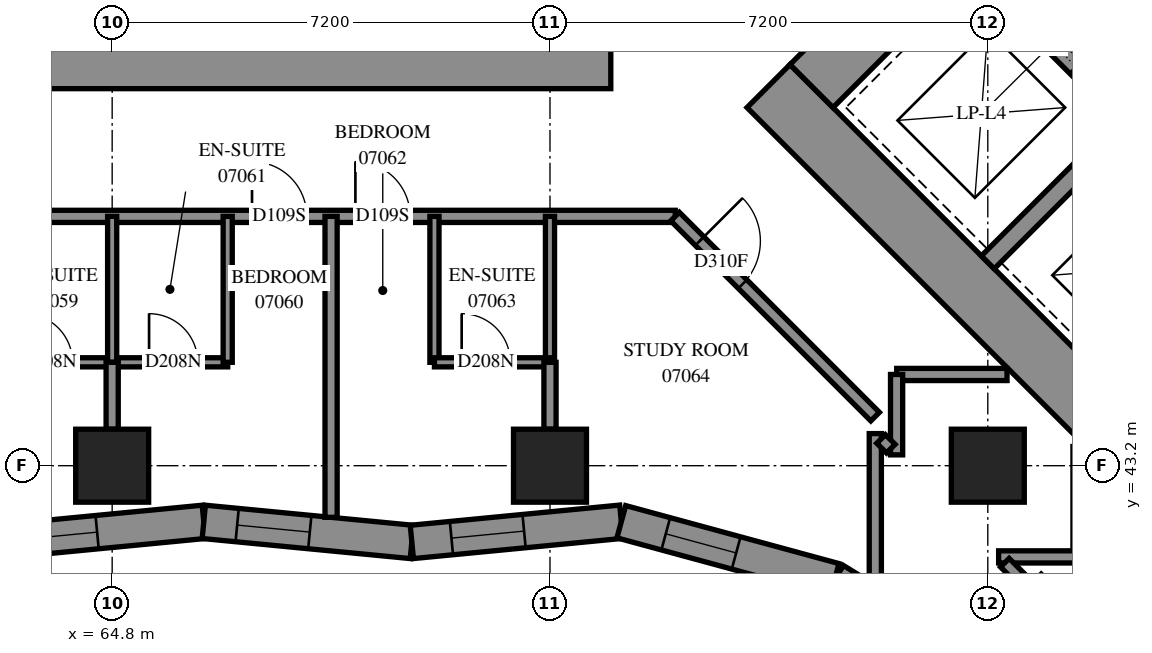
"""IFC4 building model, lengths in metres.
Left out: names, types, materials, properties, quantities, classifications, styles, units other than length and angle.
Written with IfcOpenShell. Run it as: python <this file> out.ifc"""

import sys

from ifc_helpers import new_model, si_unit, direction, frame, frame_2d, origin, origin_2d, place, context, subcontext, project, spatial, polyline, rectangle, outline, extrude, element, fill, save


model = new_model("IFC4")
c1 = context("Model", 3, precision=1e-05, world=origin(), true_north=direction((0.0, 1.0)))
c2 = subcontext(c1, "Body", "Model", "MODEL_VIEW")
j1 = project(units=[si_unit("LENGTHUNIT", "METRE"), si_unit("PLANEANGLEUNIT", "RADIAN")], contexts=[c1])
p1 = place(None, origin())
s1 = spatial("IfcSite", under=j1, at=p1, CompositionType="ELEMENT")
p2 = place(p1, origin())
s2 = spatial("IfcBuilding", under=s1, at=p2, CompositionType="ELEMENT")
p3 = place(p2, frame((0.0, 0.0, 30.4)))
s3 = spatial("IfcBuildingStorey", under=s2, at=p3, CompositionType="ELEMENT", Elevation=30.4)
for number, where, z_axis, x_axis in (
    (1, (64.8, 43.2, 0.0), (0.0, 0.0, 1.0), (1.0, 0.0, 0.0)),
    (2, (72.0, 43.2, 0.0), (0.0, 0.0, 1.0), (1.0, 0.0, 0.0)),
    (3, (79.2, 43.2, 0.0), (0.0, 0.0, 1.0), (1.0, 0.0, 0.0)),
):
    element("IfcColumn", number, at=place(p3, frame(where, z_axis=z_axis, x_axis=x_axis)), inside=s3, PredefinedType="COLUMN", context=c2, shape_type="SweptSolid", body=[
        extrude(rectangle(XDim=1.2, YDim=1.2, at=origin_2d()), origin(), (0.0, 0.0, 1.0), 3.1),
    ])
for number, where, z_axis, x_axis in (
    (4, (56.6, 49.9, -0.3), (0.0, 0.0, 1.0), (1.0, 0.0, 0.0)),
    (5, (75.594, 49.443, -0.3), (0.0, 0.0, 1.0), (0.707, -0.707, 0.0)),
):
    element("IfcWall", number, at=place(p3, frame(where, z_axis=z_axis, x_axis=x_axis)), inside=s3, PredefinedType="SHEAR", context=c2, shape_type="SweptSolid", body=[
        extrude(rectangle(XDim=16.4, YDim=1.0, at=frame_2d((8.2, 0.0))), origin(), (0.0, 0.0, 1.0), 2.7),
    ])
p4 = place(p3, frame((76.301, 49.443, -0.3), z_axis=(0.0, 0.0, 1.0), x_axis=(0.7071067812, 0.7071067812, 0.0)))
e6 = element("IfcWall", 6, at=p4, inside=s3, PredefinedType="SHEAR", context=c2, shape_type="SweptSolid", body=[
    extrude(rectangle(XDim=14.4, YDim=1.0, at=frame_2d((7.2, 0.0))), origin(), (0.0, 0.0, 1.0), 2.7),
])
p5 = place(p4, frame((4.55, 0.0, 0.3)))
e7 = element("IfcOpeningElement", 7, at=p5, cuts=e6, PredefinedType="OPENING", context=c2, shape_type="SweptSolid", body=[
    extrude(rectangle(XDim=1.1, YDim=2.1, at=frame_2d((0.55, 1.05))), frame((0.0, 0.51, 0.0), z_axis=(0.0, -1.0, 0.0), x_axis=(1.0, 0.0, 0.0)), (0.0, 0.0, 1.0), 1.02),
])
p6 = place(p4, frame((11.35, 0.0, 0.3)))
e8 = element("IfcOpeningElement", 8, at=p6, cuts=e6, PredefinedType="OPENING", context=c2, shape_type="SweptSolid", body=[
    extrude(rectangle(XDim=1.1, YDim=2.1, at=frame_2d((0.55, 1.05))), frame((0.0, 0.51, 0.0), z_axis=(0.0, -1.0, 0.0), x_axis=(1.0, 0.0, 0.0)), (0.0, 0.0, 1.0), 1.02),
])
p7 = place(p3, frame((79.2, 46.544, 0.0), z_axis=(0.0, 0.0, 1.0), x_axis=(0.7071219326, 0.7070916295, 0.0)))
e9 = element("IfcWall", 9, at=p7, inside=s3, PredefinedType="SOLIDWALL", context=c2, shape_type="SweptSolid", body=[
    extrude(rectangle(XDim=3.3, YDim=0.3, at=frame_2d((1.65, 0.0))), origin(), (0.0, 0.0, 1.0), 3.1),
])
p8 = place(p3, frame((78.988, 51.423, 0.0), z_axis=(0.0, 0.0, 1.0), x_axis=(0.7071067812, -0.7071067812, 0.0)))
e10 = element("IfcWall", 10, at=p8, inside=s3, PredefinedType="SOLIDWALL", context=c2, shape_type="SweptSolid", body=[
    extrude(rectangle(XDim=14.4, YDim=0.3, at=frame_2d((7.2, 0.0))), origin(), (0.0, 0.0, 1.0), 3.1),
])
p9 = place(p8, frame((1.25, 0.0, 0.0)))
e11 = element("IfcOpeningElement", 11, at=p9, cuts=e10, PredefinedType="OPENING", context=c2, shape_type="SweptSolid", body=[
    extrude(rectangle(XDim=1.1, YDim=2.1, at=frame_2d((0.55, 1.05))), frame((0.0, 0.16, 0.0), z_axis=(0.0, -1.0, 0.0), x_axis=(1.0, 0.0, 0.0)), (0.0, 0.0, 1.0), 0.32),
])
p10 = place(p8, frame((4.85, 0.0, 0.0)))
e12 = element("IfcOpeningElement", 12, at=p10, cuts=e10, PredefinedType="OPENING", context=c2, shape_type="SweptSolid", body=[
    extrude(rectangle(XDim=1.1, YDim=2.1, at=frame_2d((0.55, 1.05))), frame((0.0, 0.16, 0.0), z_axis=(0.0, -1.0, 0.0), x_axis=(1.0, 0.0, 0.0)), (0.0, 0.0, 1.0), 0.32),
])
p11 = place(p8, frame((8.45, 0.0, 0.0)))
e13 = element("IfcOpeningElement", 13, at=p11, cuts=e10, PredefinedType="OPENING", context=c2, shape_type="SweptSolid", body=[
    extrude(rectangle(XDim=1.1, YDim=2.1, at=frame_2d((0.55, 1.05))), frame((0.0, 0.16, 0.0), z_axis=(0.0, -1.0, 0.0), x_axis=(1.0, 0.0, 0.0)), (0.0, 0.0, 1.0), 0.32),
])
p12 = place(p8, frame((12.05, 0.0, 0.0)))
e14 = element("IfcOpeningElement", 14, at=p12, cuts=e10, PredefinedType="OPENING", context=c2, shape_type="SweptSolid", body=[
    extrude(rectangle(XDim=1.1, YDim=2.1, at=frame_2d((0.55, 1.05))), frame((0.0, 0.16, 0.0), z_axis=(0.0, -1.0, 0.0), x_axis=(1.0, 0.0, 0.0)), (0.0, 0.0, 1.0), 0.32),
])
p13 = place(p3, frame((62.885, 41.946, 0.0), z_axis=(0.0, 0.0, 1.0), x_axis=(0.9953807351, 0.0960062087, 0.0)))
e15 = element("IfcWall", 15, at=p13, inside=s3, PredefinedType="SOLIDWALL", context=c2, shape_type="SweptSolid", body=[
    extrude(outline(polyline([(-0.026, -0.275), (3.411, -0.275), (3.464, 0.275), (0.026, 0.275), (-0.026, -0.275)])), origin(), (0.0, 0.0, 1.0), 3.1),
])
p14 = place(p13, frame((0.475, 0.0, 0.5)))
e16 = element("IfcOpeningElement", 16, at=p14, cuts=e15, PredefinedType="OPENING", context=c2, shape_type="SweptSolid", body=[
    extrude(rectangle(XDim=1.2, YDim=2.45, at=frame_2d((0.6, 1.225))), frame((0.0, 0.285, 0.0), z_axis=(0.0, -1.0, 0.0), x_axis=(1.0, 0.0, 0.0)), (0.0, 0.0, 1.0), 0.57),
])
p15 = place(p3, frame((66.307, 42.276, 0.0), z_axis=(0.0, 0.0, 1.0), x_axis=(0.995380467, -0.096008989, 0.0)))
e17 = element("IfcWall", 17, at=p15, inside=s3, PredefinedType="SOLIDWALL", context=c2, shape_type="SweptSolid", body=[
    extrude(outline(polyline([(0.026, -0.275), (3.464, -0.275), (3.411, 0.275), (-0.026, 0.275), (0.026, -0.275)])), origin(), (0.0, 0.0, 1.0), 3.1),
])
p16 = place(p15, frame((0.551, 0.0, 0.5)))
e18 = element("IfcOpeningElement", 18, at=p16, cuts=e17, PredefinedType="OPENING", context=c2, shape_type="SweptSolid", body=[
    extrude(rectangle(XDim=1.2, YDim=2.45, at=frame_2d((0.6, 1.225))), frame((0.0, 0.285, 0.0), z_axis=(0.0, -1.0, 0.0), x_axis=(1.0, 0.0, 0.0)), (0.0, 0.0, 1.0), 0.57),
])
p17 = place(p3, frame((69.728, 41.946, 0.0), z_axis=(0.0, 0.0, 1.0), x_axis=(0.9953800797, 0.0960130045, 0.0)))
e19 = element("IfcWall", 19, at=p17, inside=s3, PredefinedType="SOLIDWALL", context=c2, shape_type="SweptSolid", body=[
    extrude(outline(polyline([(-0.026, -0.275), (3.411, -0.275), (3.511, 0.275), (0.026, 0.275), (-0.026, -0.275)])), origin(), (0.0, 0.0, 1.0), 3.1),
])
p18 = place(p17, frame((0.654, 0.0, 0.5)))
e20 = element("IfcOpeningElement", 20, at=p18, cuts=e19, PredefinedType="OPENING", context=c2, shape_type="SweptSolid", body=[
    extrude(rectangle(XDim=1.2, YDim=2.45, at=frame_2d((0.6, 1.225))), frame((0.0, 0.285, 0.0), z_axis=(0.0, -1.0, 0.0), x_axis=(1.0, 0.0, 0.0)), (0.0, 0.0, 1.0), 0.57),
])
p19 = place(p3, frame((73.173, 42.279, 0.0), z_axis=(0.0, 0.0, 1.0), x_axis=(0.9649780745, -0.2623305467, 0.0)))
e21 = element("IfcWall", 21, at=p19, inside=s3, PredefinedType="SOLIDWALL", context=c2, shape_type="SweptSolid", body=[
    extrude(outline(polyline([(0.05, -0.275), (3.596, -0.275), (3.675, 0.275), (-0.05, 0.275), (0.05, -0.275)])), origin(), (0.0, 0.0, 1.0), 3.1),
])
p20 = place(p19, frame((0.757, 0.0, 0.5)))
e22 = element("IfcOpeningElement", 22, at=p20, cuts=e21, PredefinedType="OPENING", context=c2, shape_type="SweptSolid", body=[
    extrude(rectangle(XDim=1.2, YDim=2.45, at=frame_2d((0.6, 1.225))), frame((0.0, 0.285, 0.0), z_axis=(0.0, -1.0, 0.0), x_axis=(1.0, 0.0, 0.0)), (0.0, 0.0, 1.0), 0.57),
])
p21 = place(p3, frame((76.681, 41.325, 0.0), z_axis=(0.0, 0.0, 1.0), x_axis=(0.852496072, -0.5227336293, 0.0)))
e23 = element("IfcWall", 23, at=p21, inside=s3, PredefinedType="SOLIDWALL", context=c2, shape_type="SweptSolid", body=[
    extrude(outline(polyline([(0.039, -0.275), (4.028, -0.275), (4.117, 0.275), (-0.039, 0.275), (0.039, -0.275)])), origin(), (0.0, 0.0, 1.0), 3.1),
])
p22 = place(p21, frame((0.719, 0.0, 0.5)))
e24 = element("IfcOpeningElement", 24, at=p22, cuts=e23, PredefinedType="OPENING", context=c2, shape_type="SweptSolid", body=[
    extrude(rectangle(XDim=1.2, YDim=2.45, at=frame_2d((0.6, 1.225))), frame((0.0, 0.285, 0.0), z_axis=(0.0, -1.0, 0.0), x_axis=(1.0, 0.0, 0.0)), (0.0, 0.0, 1.0), 0.57),
])
p23 = place(p21, frame((2.206, 0.0, 0.5)))
e25 = element("IfcOpeningElement", 25, at=p23, cuts=e23, PredefinedType="OPENING", context=c2, shape_type="SweptSolid", body=[
    extrude(rectangle(XDim=1.2, YDim=2.45, at=frame_2d((0.6, 1.225))), frame((0.0, 0.285, 0.0), z_axis=(0.0, -1.0, 0.0), x_axis=(1.0, 0.0, 0.0)), (0.0, 0.0, 1.0), 0.57),
])
p24 = place(p3, frame((54.5, 47.3, 0.0), z_axis=(0.0, 0.0, 1.0), x_axis=(1.0, 0.0, 0.0)))
e26 = element("IfcWall", 26, at=p24, inside=s3, PredefinedType="PARTITIONING", context=c2, shape_type="SweptSolid", body=[
    extrude(rectangle(XDim=19.56, YDim=0.2, at=frame_2d((9.78, 0.0))), origin(), (0.0, 0.0, 1.0), 3.1),
])
p25 = place(p24, frame((0.243, 0.0, 0.0)))
e27 = element("IfcOpeningElement", 27, at=p25, cuts=e26, PredefinedType="OPENING", context=c2, shape_type="SweptSolid", body=[
    extrude(rectangle(XDim=1.0, YDim=2.1, at=frame_2d((0.5, 1.05))), frame((0.0, 0.11, 0.0), z_axis=(0.0, -1.0, 0.0), x_axis=(1.0, 0.0, 0.0)), (0.0, 0.0, 1.0), 0.22),
])
p26 = place(p24, frame((5.4, 0.0, 0.0)))
e28 = element("IfcOpeningElement", 28, at=p26, cuts=e26, PredefinedType="OPENING", context=c2, shape_type="SweptSolid", body=[
    extrude(rectangle(XDim=0.9, YDim=2.1, at=frame_2d((0.45, 1.05))), frame((0.0, 0.11, 0.0), z_axis=(0.0, -1.0, 0.0), x_axis=(1.0, 0.0, 0.0)), (0.0, 0.0, 1.0), 0.22),
])
p27 = place(p24, frame((7.1, 0.0, 0.0)))
e29 = element("IfcOpeningElement", 29, at=p27, cuts=e26, PredefinedType="OPENING", context=c2, shape_type="SweptSolid", body=[
    extrude(rectangle(XDim=0.9, YDim=2.1, at=frame_2d((0.45, 1.05))), frame((0.0, 0.11, 0.0), z_axis=(0.0, -1.0, 0.0), x_axis=(1.0, 0.0, 0.0)), (0.0, 0.0, 1.0), 0.22),
])
p28 = place(p24, frame((12.6, 0.0, 0.0)))
e30 = element("IfcOpeningElement", 30, at=p28, cuts=e26, PredefinedType="OPENING", context=c2, shape_type="SweptSolid", body=[
    extrude(rectangle(XDim=0.9, YDim=2.1, at=frame_2d((0.45, 1.05))), frame((0.0, 0.11, 0.0), z_axis=(0.0, -1.0, 0.0), x_axis=(1.0, 0.0, 0.0)), (0.0, 0.0, 1.0), 0.22),
])
p29 = place(p24, frame((14.3, 0.0, 0.0)))
e31 = element("IfcOpeningElement", 31, at=p29, cuts=e26, PredefinedType="OPENING", context=c2, shape_type="SweptSolid", body=[
    extrude(rectangle(XDim=0.9, YDim=2.1, at=frame_2d((0.45, 1.05))), frame((0.0, 0.11, 0.0), z_axis=(0.0, -1.0, 0.0), x_axis=(1.0, 0.0, 0.0)), (0.0, 0.0, 1.0), 0.22),
])
p30 = place(p3, frame((68.4, 42.351, 0.0), z_axis=(0.0, 0.0, 1.0), x_axis=(0.0, 1.0, 0.0)))
e32 = element("IfcWall", 32, at=p30, inside=s3, PredefinedType="PARTITIONING", context=c2, shape_type="SweptSolid", body=[
    extrude(rectangle(XDim=4.949, YDim=0.2, at=frame_2d((2.475, 0.0))), origin(), (0.0, 0.0, 1.0), 3.1),
])
p31 = place(p3, frame((74.057, 47.297, 0.0), z_axis=(0.0, 0.0, 1.0), x_axis=(0.7071067812, -0.7071067812, 0.0)))
e33 = element("IfcWall", 33, at=p31, inside=s3, PredefinedType="PARTITIONING", context=c2, shape_type="SweptSolid", body=[
    extrude(rectangle(XDim=4.653, YDim=0.2, at=frame_2d((2.326, 0.0))), origin(), (0.0, 0.0, 1.0), 3.1),
])
p32 = place(p31, frame((0.57, 0.0, 0.0)))
e34 = element("IfcOpeningElement", 34, at=p32, cuts=e33, PredefinedType="OPENING", context=c2, shape_type="SweptSolid", body=[
    extrude(rectangle(XDim=1.0, YDim=2.1, at=frame_2d((0.5, 1.05))), frame((0.0, 0.11, 0.0), z_axis=(0.0, -1.0, 0.0), x_axis=(1.0, 0.0, 0.0)), (0.0, 0.0, 1.0), 0.22),
])
p33 = place(p3, frame((62.9, 44.9, 0.0), z_axis=(0.0, 0.0, 1.0), x_axis=(1.0, 0.0, 0.0)))
e35 = element("IfcWall", 35, at=p33, inside=s3, PredefinedType="PARTITIONING", context=c2, shape_type="SweptSolid", body=[
    extrude(rectangle(XDim=3.8, YDim=0.15, at=frame_2d((1.9, 0.0))), origin(), (0.0, 0.0, 1.0), 3.1),
])
p34 = place(p33, frame((0.448, 0.0, 0.0)))
e36 = element("IfcOpeningElement", 36, at=p34, cuts=e35, PredefinedType="OPENING", context=c2, shape_type="SweptSolid", body=[
    extrude(rectangle(XDim=0.8, YDim=2.1, at=frame_2d((0.4, 1.05))), frame((0.0, 0.085, 0.0), z_axis=(0.0, -1.0, 0.0), x_axis=(1.0, 0.0, 0.0)), (0.0, 0.0, 1.0), 0.17),
])
p35 = place(p33, frame((2.507, 0.0, 0.0)))
e37 = element("IfcOpeningElement", 37, at=p35, cuts=e35, PredefinedType="OPENING", context=c2, shape_type="SweptSolid", body=[
    extrude(rectangle(XDim=0.8, YDim=2.1, at=frame_2d((0.4, 1.05))), frame((0.0, 0.085, 0.0), z_axis=(0.0, -1.0, 0.0), x_axis=(1.0, 0.0, 0.0)), (0.0, 0.0, 1.0), 0.17),
])
p36 = place(p3, frame((77.35, 41.237, 0.0), z_axis=(0.0, 0.0, 1.0), x_axis=(0.0, 1.0, 0.0)))
e38 = element("IfcWall", 38, at=p36, inside=s3, PredefinedType="PARTITIONING", context=c2, shape_type="SweptSolid", body=[
    extrude(rectangle(XDim=2.491, YDim=0.2, at=frame_2d((1.245, 0.0))), origin(), (0.0, 0.0, 1.0), 3.1),
])
for number, where, z_axis, x_axis in (
    (39, (66.7, 44.9, 0.0), (0.0, 0.0, 1.0), (0.0, 1.0, 0.0)),
    (40, (64.8, 44.9, 0.0), (0.0, 0.0, 1.0), (0.0, 1.0, 0.0)),
    (41, (70.1, 44.9, 0.0), (0.0, 0.0, 1.0), (0.0, 1.0, 0.0)),
    (42, (72.0, 44.9, 0.0), (0.0, 0.0, 1.0), (0.0, 1.0, 0.0)),
):
    element("IfcWall", number, at=place(p3, frame(where, z_axis=z_axis, x_axis=x_axis)), inside=s3, PredefinedType="PARTITIONING", context=c2, shape_type="SweptSolid", body=[
        extrude(rectangle(XDim=2.4, YDim=0.15, at=frame_2d((1.2, 0.0))), origin(), (0.0, 0.0, 1.0), 3.1),
    ])
p37 = place(p3, frame((70.1, 44.9, 0.0), z_axis=(0.0, 0.0, 1.0), x_axis=(1.0, 0.0, 0.0)))
e43 = element("IfcWall", 43, at=p37, inside=s3, PredefinedType="PARTITIONING", context=c2, shape_type="SweptSolid", body=[
    extrude(rectangle(XDim=1.9, YDim=0.15, at=frame_2d((0.95, 0.0))), origin(), (0.0, 0.0, 1.0), 3.1),
])
p38 = place(p37, frame((0.448, 0.0, 0.0)))
e44 = element("IfcOpeningElement", 44, at=p38, cuts=e43, PredefinedType="OPENING", context=c2, shape_type="SweptSolid", body=[
    extrude(rectangle(XDim=0.8, YDim=2.1, at=frame_2d((0.4, 1.05))), frame((0.0, 0.085, 0.0), z_axis=(0.0, -1.0, 0.0), x_axis=(1.0, 0.0, 0.0)), (0.0, 0.0, 1.0), 0.17),
])
for number, where, z_axis, x_axis in (
    (45, (77.702, 44.7, 0.0), (0.0, 0.0, 1.0), (1.0, 0.0, 0.0)),
    (46, (80.7, 41.702, 0.0), (0.0, 0.0, 1.0), (0.0, 1.0, 0.0)),
):
    element("IfcWall", number, at=place(p3, frame(where, z_axis=z_axis, x_axis=x_axis)), inside=s3, PredefinedType="PARTITIONING", context=c2, shape_type="SweptSolid", body=[
        extrude(rectangle(XDim=1.814, YDim=0.2, at=frame_2d((0.907, 0.0))), origin(), (0.0, 0.0, 1.0), 3.1),
    ])
for number, where, z_axis, x_axis in (
    (47, (77.7, 43.378, 0.0), (0.0, 0.0, 1.0), (0.0, 1.0, 0.0)),
    (48, (79.378, 41.7, 0.0), (0.0, 0.0, 1.0), (1.0, 0.0, 0.0)),
):
    element("IfcWall", number, at=place(p3, frame(where, z_axis=z_axis, x_axis=x_axis)), inside=s3, PredefinedType="PARTITIONING", context=c2, shape_type="SweptSolid", body=[
        extrude(rectangle(XDim=1.322, YDim=0.2, at=frame_2d((0.661, 0.0))), origin(), (0.0, 0.0, 1.0), 3.1),
    ])
for number, where, z_axis, x_axis in (
    (49, (64.8, 43.8, 0.0), (0.0, 0.0, 1.0), (0.0, 1.0, 0.0)),
    (50, (72.0, 43.8, 0.0), (0.0, 0.0, 1.0), (0.0, 1.0, 0.0)),
):
    element("IfcWall", number, at=place(p3, frame(where, z_axis=z_axis, x_axis=x_axis)), inside=s3, PredefinedType="PARTITIONING", context=c2, shape_type="SweptSolid", body=[
        extrude(rectangle(XDim=1.1, YDim=0.2, at=frame_2d((0.55, 0.0))), origin(), (0.0, 0.0, 1.0), 3.1),
    ])
p39 = place(p3, frame((77.445, 43.64, 0.0), z_axis=(0.0, 0.0, 1.0), x_axis=(0.7071067812, -0.7071067812, 0.0)))
e51 = element("IfcWall", 51, at=p39, inside=s3, PredefinedType="PARTITIONING", context=c2, shape_type="SweptSolid", body=[
    extrude(rectangle(XDim=0.225, YDim=0.2, at=frame_2d((0.113, 0.0))), origin(), (0.0, 0.0, 1.0), 3.1),
])
p40 = place(p3, frame((79.481, 41.605, 0.0), z_axis=(0.0, 0.0, 1.0), x_axis=(0.7071067812, -0.7071067812, 0.0)))
e52 = element("IfcWall", 52, at=p40, inside=s3, PredefinedType="PARTITIONING", context=c2, shape_type="SweptSolid", body=[
    extrude(rectangle(XDim=0.355, YDim=0.2, at=frame_2d((0.177, 0.0))), origin(), (0.0, 0.0, 1.0), 3.1),
])
p41 = place(p14, origin())
e53 = element("IfcWindow", 53, at=p41, inside=s3, PartitioningType="SINGLE_PANEL", PredefinedType="WINDOW", context=c2, shape_type="SweptSolid", body=[
    extrude(rectangle(XDim=1.2, YDim=2.45, at=frame_2d((0.6, 1.225))), frame((0.0, 0.155, 0.0), z_axis=(0.0, -1.0, 0.0), x_axis=(1.0, 0.0, 0.0)), (0.0, 0.0, 1.0), 0.06),
])
fill(e16, e53)
p42 = place(p16, origin())
e54 = element("IfcWindow", 54, at=p42, inside=s3, PartitioningType="SINGLE_PANEL", PredefinedType="WINDOW", context=c2, shape_type="SweptSolid", body=[
    extrude(rectangle(XDim=1.2, YDim=2.45, at=frame_2d((0.6, 1.225))), frame((0.0, 0.155, 0.0), z_axis=(0.0, -1.0, 0.0), x_axis=(1.0, 0.0, 0.0)), (0.0, 0.0, 1.0), 0.06),
])
fill(e18, e54)
p43 = place(p18, origin())
e55 = element("IfcWindow", 55, at=p43, inside=s3, PartitioningType="SINGLE_PANEL", PredefinedType="WINDOW", context=c2, shape_type="SweptSolid", body=[
    extrude(rectangle(XDim=1.2, YDim=2.45, at=frame_2d((0.6, 1.225))), frame((0.0, 0.155, 0.0), z_axis=(0.0, -1.0, 0.0), x_axis=(1.0, 0.0, 0.0)), (0.0, 0.0, 1.0), 0.06),
])
fill(e20, e55)
p44 = place(p20, origin())
e56 = element("IfcWindow", 56, at=p44, inside=s3, PartitioningType="SINGLE_PANEL", PredefinedType="WINDOW", context=c2, shape_type="SweptSolid", body=[
    extrude(rectangle(XDim=1.2, YDim=2.45, at=frame_2d((0.6, 1.225))), frame((0.0, 0.155, 0.0), z_axis=(0.0, -1.0, 0.0), x_axis=(1.0, 0.0, 0.0)), (0.0, 0.0, 1.0), 0.06),
])
fill(e22, e56)
p45 = place(p9, origin())
e57 = element("IfcDoor", 57, at=p45, inside=s3, OperationType="SLIDING_TO_LEFT", PredefinedType="DOOR", context=c2, shape_type="SweptSolid", body=[
    extrude(rectangle(XDim=1.1, YDim=2.1, at=frame_2d((0.55, 1.05))), frame((0.0, 0.025, 0.0), z_axis=(0.0, -1.0, 0.0), x_axis=(1.0, 0.0, 0.0)), (0.0, 0.0, 1.0), 0.05),
])
fill(e11, e57)
p46 = place(p34, origin())
e58 = element("IfcDoor", 58, at=p46, inside=s3, OperationType="SINGLE_SWING_RIGHT", PredefinedType="DOOR", context=c2, shape_type="SweptSolid", body=[
    extrude(rectangle(XDim=0.8, YDim=2.1, at=frame_2d((0.4, 1.05))), frame((0.0, 0.025, 0.0), z_axis=(0.0, -1.0, 0.0), x_axis=(1.0, 0.0, 0.0)), (0.0, 0.0, 1.0), 0.05),
])
fill(e36, e58)
p47 = place(p28, origin())
e59 = element("IfcDoor", 59, at=p47, inside=s3, OperationType="SINGLE_SWING_LEFT", PredefinedType="DOOR", context=c2, shape_type="SweptSolid", body=[
    extrude(rectangle(XDim=0.9, YDim=2.1, at=frame_2d((0.45, 1.05))), frame((0.0, 0.025, 0.0), z_axis=(0.0, -1.0, 0.0), x_axis=(1.0, 0.0, 0.0)), (0.0, 0.0, 1.0), 0.05),
])
fill(e30, e59)
p48 = place(p35, origin())
e60 = element("IfcDoor", 60, at=p48, inside=s3, OperationType="SINGLE_SWING_RIGHT", PredefinedType="DOOR", context=c2, shape_type="SweptSolid", body=[
    extrude(rectangle(XDim=0.8, YDim=2.1, at=frame_2d((0.4, 1.05))), frame((0.0, 0.025, 0.0), z_axis=(0.0, -1.0, 0.0), x_axis=(1.0, 0.0, 0.0)), (0.0, 0.0, 1.0), 0.05),
])
fill(e37, e60)
p49 = place(p29, origin())
e61 = element("IfcDoor", 61, at=p49, inside=s3, OperationType="SINGLE_SWING_RIGHT", PredefinedType="DOOR", context=c2, shape_type="SweptSolid", body=[
    extrude(rectangle(XDim=0.9, YDim=2.1, at=frame_2d((0.45, 1.05))), frame((0.0, 0.025, 0.0), z_axis=(0.0, -1.0, 0.0), x_axis=(1.0, 0.0, 0.0)), (0.0, 0.0, 1.0), 0.05),
])
fill(e31, e61)
p50 = place(p38, origin())
e62 = element("IfcDoor", 62, at=p50, inside=s3, OperationType="SINGLE_SWING_RIGHT", PredefinedType="DOOR", context=c2, shape_type="SweptSolid", body=[
    extrude(rectangle(XDim=0.8, YDim=2.1, at=frame_2d((0.4, 1.05))), frame((0.0, 0.025, 0.0), z_axis=(0.0, -1.0, 0.0), x_axis=(1.0, 0.0, 0.0)), (0.0, 0.0, 1.0), 0.05),
])
fill(e44, e62)
p51 = place(p32, origin())
e63 = element("IfcDoor", 63, at=p51, inside=s3, OperationType="SINGLE_SWING_LEFT", PredefinedType="DOOR", context=c2, shape_type="SweptSolid", body=[
    extrude(rectangle(XDim=1.0, YDim=2.1, at=frame_2d((0.5, 1.05))), frame((0.0, 0.025, 0.0), z_axis=(0.0, -1.0, 0.0), x_axis=(1.0, 0.0, 0.0)), (0.0, 0.0, 1.0), 0.05),
])
fill(e34, e63)
save(model, sys.argv[1])
